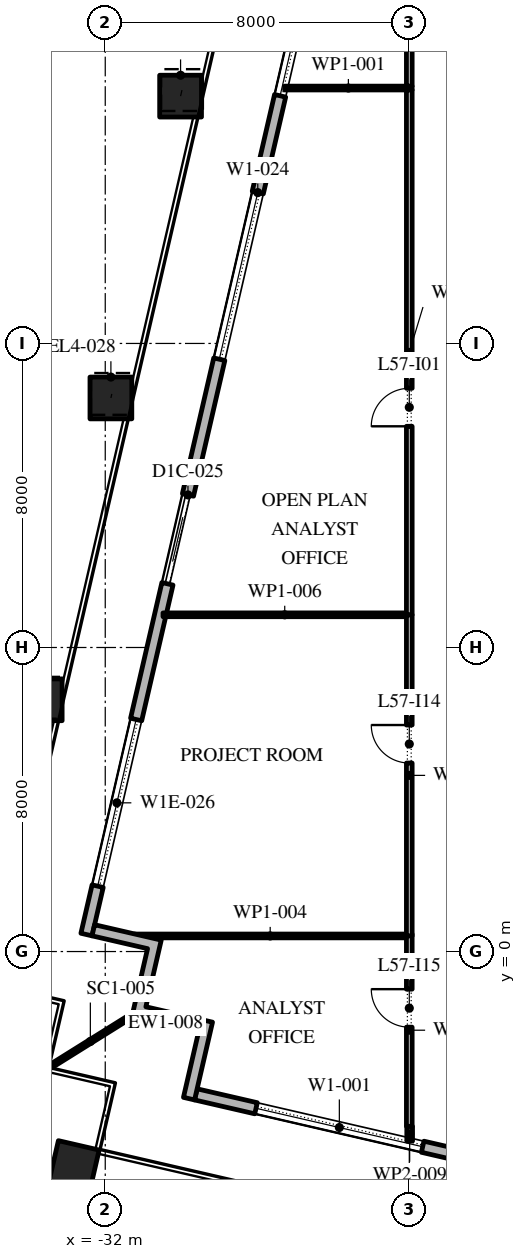
"""IFC4 building model, lengths in metres.
Left out: names, types, materials, properties, quantities, classifications, styles, units other than length and angle.
Written with IfcOpenShell. Run it as: python <this file> out.ifc"""

import sys

from ifc_helpers import new_model, si_unit, direction, frame, frame_2d, origin, origin_2d, place, context, subcontext, project, spatial, polyline, rectangle, outline, extrude, element, fill, save


model = new_model("IFC4")
c1 = context("Model", 3, precision=1e-05, world=origin(), true_north=direction((0.0, 1.0)))
c2 = subcontext(c1, "Body", "Model", "MODEL_VIEW")
j1 = project(units=[si_unit("LENGTHUNIT", "METRE"), si_unit("PLANEANGLEUNIT", "RADIAN")], contexts=[c1])
p1 = place(None, origin())
s1 = spatial("IfcSite", under=j1, at=p1, CompositionType="ELEMENT")
p2 = place(p1, origin())
s2 = spatial("IfcBuilding", under=s1, at=p2, CompositionType="ELEMENT")
p3 = place(p2, frame((0.0, 0.0, 264.0)))
s3 = spatial("IfcBuildingStorey", under=s2, at=p3, CompositionType="ELEMENT", Elevation=264.0)
p4 = place(p3, frame((-32.821, -5.635, 0.0), z_axis=(0.0, 0.0, 1.0), x_axis=(0.974370064785, -0.224951054344, 0.0)))
e1 = element("IfcColumn", 1, at=p4, inside=s3, PredefinedType="COLUMN", context=c2, shape_type="SweptSolid", body=[
    extrude(rectangle(XDim=1.1, YDim=1.1, at=origin_2d()), origin(), (0.0, 0.0, 1.0), 4.2),
])
p5 = place(p3, frame((-30.018, 22.507, 0.0), z_axis=(0.00871278458, 0.037987740768, 0.999240220836), x_axis=(-0.974691740237, 0.22355315143, 0.0)))
e2 = element("IfcColumn", 2, at=p5, inside=s3, PredefinedType="COLUMN", context=c2, shape_type="SweptSolid", body=[
    extrude(rectangle(XDim=1.1, YDim=1.1, at=origin_2d()), origin(), (0.0, 0.0, 1.0), 4.203),
])
p6 = place(p3, frame((-31.851, 14.565, 0.0), z_axis=(0.005810975449, 0.025335852957, 0.999662106474), x_axis=(-0.974691740237, 0.22355315143, 0.0)))
e3 = element("IfcColumn", 3, at=p6, inside=s3, PredefinedType="COLUMN", context=c2, shape_type="SweptSolid", body=[
    extrude(rectangle(XDim=1.1, YDim=1.1, at=origin_2d()), origin(), (0.0, 0.0, 1.0), 4.201),
])
p7 = place(p3, frame((-33.685, 6.624, 0.0), z_axis=(0.002906224189, 0.012671137464, 0.999915494498), x_axis=(-0.974691740237, 0.22355315143, 0.0)))
e4 = element("IfcColumn", 4, at=p7, inside=s3, PredefinedType="COLUMN", context=c2, shape_type="SweptSolid", body=[
    extrude(rectangle(XDim=1.1, YDim=1.1, at=origin_2d()), origin(), (0.0, 0.0, 1.0), 4.2),
])
p8 = place(p3, frame((-29.616, -3.758, 0.0), z_axis=(0.0, 0.0, 1.0), x_axis=(0.974370532314, -0.224949029246, 0.0)))
e5 = element("IfcWall", 5, at=p8, inside=s3, PredefinedType="STANDARD", context=c2, shape_type="SweptSolid", body=[
    extrude(rectangle(XDim=48.0, YDim=0.3, at=frame_2d((24.0, 0.0))), origin(), (0.0, 0.0, 1.0), 4.0),
])
p9 = place(p8, frame((1.625, 0.0, 0.45)))
e6 = element("IfcOpeningElement", 6, at=p9, cuts=e5, PredefinedType="OPENING", context=c2, shape_type="SweptSolid", body=[
    extrude(rectangle(XDim=4.5, YDim=3.05, at=frame_2d((2.25, 1.525))), frame((0.0, 0.16, 0.0), z_axis=(0.0, -1.0, 0.0), x_axis=(1.0, 0.0, 0.0)), (0.0, 0.0, 1.0), 0.32),
])
p10 = place(p8, frame((10.575, 0.0, 0.0)))
e7 = element("IfcOpeningElement", 7, at=p10, cuts=e5, PredefinedType="OPENING", context=c2, shape_type="SweptSolid", body=[
    extrude(rectangle(XDim=2.4, YDim=3.5, at=frame_2d((1.2, 1.75))), frame((0.0, 0.16, 0.0), z_axis=(0.0, -1.0, 0.0), x_axis=(1.0, 0.0, 0.0)), (0.0, 0.0, 1.0), 0.32),
])
p11 = place(p8, frame((17.575, 0.0, 0.45)))
e8 = element("IfcOpeningElement", 8, at=p11, cuts=e5, PredefinedType="OPENING", context=c2, shape_type="SweptSolid", body=[
    extrude(rectangle(XDim=4.5, YDim=3.0, at=frame_2d((2.25, 1.5))), frame((0.0, 0.16, 0.0), z_axis=(0.0, -1.0, 0.0), x_axis=(1.0, 0.0, 0.0)), (0.0, 0.0, 1.0), 0.32),
])
p12 = place(p8, frame((25.625, 0.0, 0.45)))
e9 = element("IfcOpeningElement", 9, at=p12, cuts=e5, PredefinedType="OPENING", context=c2, shape_type="SweptSolid", body=[
    extrude(rectangle(XDim=4.5, YDim=2.95, at=frame_2d((2.25, 1.475))), frame((0.0, 0.16, 0.0), z_axis=(0.0, -1.0, 0.0), x_axis=(1.0, 0.0, 0.0)), (0.0, 0.0, 1.0), 0.32),
])
p13 = place(p8, frame((33.675, 0.0, 0.45)))
e10 = element("IfcOpeningElement", 10, at=p13, cuts=e5, PredefinedType="OPENING", context=c2, shape_type="SweptSolid", body=[
    extrude(rectangle(XDim=4.5, YDim=2.825, at=frame_2d((2.25, 1.413))), frame((0.0, 0.16, 0.0), z_axis=(0.0, -1.0, 0.0), x_axis=(1.0, 0.0, 0.0)), (0.0, 0.0, 1.0), 0.32),
])
p14 = place(p8, frame((42.775, 0.0, 0.0)))
e11 = element("IfcOpeningElement", 11, at=p14, cuts=e5, PredefinedType="OPENING", context=c2, shape_type="SweptSolid", body=[
    extrude(rectangle(XDim=2.4, YDim=3.5, at=frame_2d((1.2, 1.75))), frame((0.0, 0.16, 0.0), z_axis=(0.0, -1.0, 0.0), x_axis=(1.0, 0.0, 0.0)), (0.0, 0.0, 1.0), 0.32),
])
p15 = place(p3, frame((-21.359, 48.678, 0.0), z_axis=(0.0, 0.0, 1.0), x_axis=(-0.224949198343, -0.974370493275, 0.0)))
e12 = element("IfcWall", 12, at=p15, inside=s3, PredefinedType="STANDARD", context=c2, shape_type="SweptSolid", body=[
    extrude(rectangle(XDim=49.5, YDim=0.3, at=frame_2d((24.75, 0.0))), origin(), (0.0, 0.0, 1.0), 4.0),
])
p16 = place(p15, frame((1.157, 0.0, 0.45)))
e13 = element("IfcOpeningElement", 13, at=p16, cuts=e12, PredefinedType="OPENING", context=c2, shape_type="SweptSolid", body=[
    extrude(rectangle(XDim=4.5, YDim=3.05, at=frame_2d((2.25, 1.525))), frame((0.0, 0.16, 0.0), z_axis=(0.0, -1.0, 0.0), x_axis=(1.0, 0.0, 0.0)), (0.0, 0.0, 1.0), 0.32),
])
p17 = place(p15, frame((9.171, 0.0, 0.0)))
e14 = element("IfcOpeningElement", 14, at=p17, cuts=e12, PredefinedType="OPENING", context=c2, shape_type="SweptSolid", body=[
    extrude(rectangle(XDim=2.4, YDim=3.5, at=frame_2d((1.2, 1.75))), frame((0.0, 0.16, 0.0), z_axis=(0.0, -1.0, 0.0), x_axis=(1.0, 0.0, 0.0)), (0.0, 0.0, 1.0), 0.32),
])
p18 = place(p15, frame((15.236, 0.0, 0.45)))
e15 = element("IfcOpeningElement", 15, at=p18, cuts=e12, PredefinedType="OPENING", context=c2, shape_type="SweptSolid", body=[
    extrude(rectangle(XDim=4.5, YDim=3.05, at=frame_2d((2.25, 1.525))), frame((0.0, 0.16, 0.0), z_axis=(0.0, -1.0, 0.0), x_axis=(1.0, 0.0, 0.0)), (0.0, 0.0, 1.0), 0.32),
])
p19 = place(p15, frame((22.35, 0.0, 0.45)))
e16 = element("IfcOpeningElement", 16, at=p19, cuts=e12, PredefinedType="OPENING", context=c2, shape_type="SweptSolid", body=[
    extrude(rectangle(XDim=4.5, YDim=3.05, at=frame_2d((2.25, 1.525))), frame((0.0, 0.16, 0.0), z_axis=(0.0, -1.0, 0.0), x_axis=(1.0, 0.0, 0.0)), (0.0, 0.0, 1.0), 0.32),
])
p20 = place(p15, frame((29.464, 0.0, 0.45)))
e17 = element("IfcOpeningElement", 17, at=p20, cuts=e12, PredefinedType="OPENING", context=c2, shape_type="SweptSolid", body=[
    extrude(rectangle(XDim=4.5, YDim=3.05, at=frame_2d((2.25, 1.525))), frame((0.0, 0.16, 0.0), z_axis=(0.0, -1.0, 0.0), x_axis=(1.0, 0.0, 0.0)), (0.0, 0.0, 1.0), 0.32),
])
p21 = place(p15, frame((37.628, 0.0, 0.0)))
e18 = element("IfcOpeningElement", 18, at=p21, cuts=e12, PredefinedType="OPENING", context=c2, shape_type="SweptSolid", body=[
    extrude(rectangle(XDim=2.4, YDim=3.325, at=frame_2d((1.2, 1.663))), frame((0.0, 0.16, 0.0), z_axis=(0.0, -1.0, 0.0), x_axis=(1.0, 0.0, 0.0)), (0.0, 0.0, 1.0), 0.32),
])
p22 = place(p15, frame((43.693, 0.0, 0.45)))
e19 = element("IfcOpeningElement", 19, at=p22, cuts=e12, PredefinedType="OPENING", context=c2, shape_type="SweptSolid", body=[
    extrude(rectangle(XDim=4.5, YDim=2.825, at=frame_2d((2.25, 1.413))), frame((0.0, 0.16, 0.0), z_axis=(0.0, -1.0, 0.0), x_axis=(1.0, 0.0, 0.0)), (0.0, 0.0, 1.0), 0.32),
])
p23 = place(p3, origin())
e20 = element("IfcWall", 20, at=p23, inside=s3, PredefinedType="STANDARD", context=c2, shape_type="SweptSolid", body=[
    extrude(outline(polyline([(-31.291, -1.678), (-30.886, 0.076), (-32.348, 0.413), (-32.28, 0.705), (-30.526, 0.301), (-30.931, -1.453), (-29.177, -1.858), (-29.65, -3.905), (-29.942, -3.837), (-29.537, -2.083), (-31.291, -1.678)])), origin(), (0.0, 0.0, 1.0), 4.0),
])
p24 = place(p3, frame((-31.291, -1.678, -0.05), z_axis=(0.0, 0.0, 1.0), x_axis=(-0.84807753525, -0.529872148923, 0.0)))
e21 = element("IfcWall", 21, at=p24, inside=s3, PredefinedType="STANDARD", context=c2, shape_type="SweptSolid", body=[
    extrude(rectangle(XDim=2.596, YDim=0.1, at=frame_2d((1.298, 0.0))), origin(), (0.0, 0.0, 1.0), 4.05),
])
p25 = place(p3, frame((-27.28, 22.72, 0.0), z_axis=(0.0, 0.0, 1.0), x_axis=(1.0, 0.0, 0.0)))
e22 = element("IfcWall", 22, at=p25, inside=s3, PredefinedType="PARTITIONING", context=c2, shape_type="SweptSolid", body=[
    extrude(rectangle(XDim=3.355, YDim=0.1, at=frame_2d((1.677, 0.0))), origin(), (0.0, 0.0, 1.0), 4.0),
])
p26 = place(p3, frame((-24.0, -4.6, 0.0), z_axis=(0.0, 0.0, 1.0), x_axis=(0.0, 1.0, 0.0)))
e23 = element("IfcWall", 23, at=p26, inside=s3, PredefinedType="PARTITIONING", context=c2, shape_type="SweptSolid", body=[
    extrude(rectangle(XDim=5.06, YDim=0.15, at=frame_2d((2.53, 0.0))), origin(), (0.0, 0.0, 1.0), 4.0),
])
p27 = place(p26, frame((2.61, 0.0, 0.0)))
e24 = element("IfcOpeningElement", 24, at=p27, cuts=e23, PredefinedType="OPENING", context=c2, shape_type="SweptSolid", body=[
    extrude(rectangle(XDim=1.0, YDim=2.1, at=frame_2d((0.5, 1.05))), frame((0.0, 0.085, 0.0), z_axis=(0.0, -1.0, 0.0), x_axis=(1.0, 0.0, 0.0)), (0.0, 0.0, 1.0), 0.17),
])
p28 = place(p3, frame((-24.075, 0.41, 0.0), z_axis=(0.0, 0.0, 1.0), x_axis=(-1.0, 0.0, 0.0)))
e25 = element("IfcWall", 25, at=p28, inside=s3, PredefinedType="PARTITIONING", context=c2, shape_type="SweptSolid", body=[
    extrude(rectangle(XDim=7.17, YDim=0.1, at=frame_2d((3.585, 0.0))), origin(), (0.0, 0.0, 1.0), 4.0),
])
p29 = place(p3, frame((-24.0, 0.41, 0.0), z_axis=(0.0, 0.0, 1.0), x_axis=(0.0, 1.0, 0.0)))
e26 = element("IfcWall", 26, at=p29, inside=s3, PredefinedType="PARTITIONING", context=c2, shape_type="SweptSolid", body=[
    extrude(rectangle(XDim=8.45, YDim=0.15, at=frame_2d((4.225, 0.0))), origin(), (0.0, 0.0, 1.0), 4.0),
])
p30 = place(p29, frame((4.55, 0.0, 0.0)))
e27 = element("IfcOpeningElement", 27, at=p30, cuts=e26, PredefinedType="OPENING", context=c2, shape_type="SweptSolid", body=[
    extrude(rectangle(XDim=1.0, YDim=2.1, at=frame_2d((0.5, 1.05))), frame((0.0, 0.085, 0.0), z_axis=(0.0, -1.0, 0.0), x_axis=(1.0, 0.0, 0.0)), (0.0, 0.0, 1.0), 0.17),
])
p31 = place(p3, frame((-24.075, 8.86, 0.0), z_axis=(0.0, 0.0, 1.0), x_axis=(-1.0, 0.0, 0.0)))
e28 = element("IfcWall", 28, at=p31, inside=s3, PredefinedType="PARTITIONING", context=c2, shape_type="SweptSolid", body=[
    extrude(rectangle(XDim=6.405, YDim=0.1, at=frame_2d((3.203, 0.0))), origin(), (0.0, 0.0, 1.0), 4.0),
])
p32 = place(p3, frame((-24.0, 8.86, 0.0), z_axis=(0.0, 0.0, 1.0), x_axis=(0.0, 1.0, 0.0)))
e29 = element("IfcWall", 29, at=p32, inside=s3, PredefinedType="PARTITIONING", context=c2, shape_type="SweptSolid", body=[
    extrude(rectangle(XDim=13.81, YDim=0.15, at=frame_2d((6.905, 0.0))), origin(), (0.0, 0.0, 1.0), 4.0),
])
p33 = place(p32, frame((4.96, 0.0, 0.0)))
e30 = element("IfcOpeningElement", 30, at=p33, cuts=e29, PredefinedType="OPENING", context=c2, shape_type="SweptSolid", body=[
    extrude(rectangle(XDim=1.0, YDim=2.1, at=frame_2d((0.5, 1.05))), frame((0.0, 0.085, 0.0), z_axis=(0.0, -1.0, 0.0), x_axis=(1.0, 0.0, 0.0)), (0.0, 0.0, 1.0), 0.17),
])
p34 = place(p3, frame((-24.0, 22.77, 0.0), z_axis=(0.0, 0.0, 1.0), x_axis=(0.0, 1.0, 0.0)))
e31 = element("IfcWall", 31, at=p34, inside=s3, PredefinedType="PARTITIONING", context=c2, shape_type="SweptSolid", body=[
    extrude(rectangle(XDim=9.93, YDim=0.15, at=frame_2d((4.965, 0.0))), origin(), (0.0, 0.0, 1.0), 4.0),
])
p35 = place(p34, frame((4.53, 0.0, 0.0)))
e32 = element("IfcOpeningElement", 32, at=p35, cuts=e31, PredefinedType="OPENING", context=c2, shape_type="SweptSolid", body=[
    extrude(rectangle(XDim=1.0, YDim=2.1, at=frame_2d((0.5, 1.05))), frame((0.0, 0.085, 0.0), z_axis=(0.0, -1.0, 0.0), x_axis=(1.0, 0.0, 0.0)), (0.0, 0.0, 1.0), 0.17),
])
p36 = place(p3, frame((-23.99, -4.986, 0.0), z_axis=(0.0, 0.0, 1.0), x_axis=(0.0, 1.0, 0.0)))
e33 = element("IfcWall", 33, at=p36, inside=s3, PredefinedType="PARTITIONING", context=c2, shape_type="SweptSolid", body=[
    extrude(rectangle(XDim=0.386, YDim=0.15, at=frame_2d((0.193, 0.0))), origin(), (0.0, 0.0, 1.0), 4.0),
])
p37 = place(p9, origin())
e34 = element("IfcWindow", 34, at=p37, inside=s3, PartitioningType="DOUBLE_PANEL_VERTICAL", PredefinedType="WINDOW", context=c2, shape_type="SweptSolid", body=[
    extrude(rectangle(XDim=4.5, YDim=3.05, at=frame_2d((2.25, 1.525))), frame((0.0, 0.03, 0.0), z_axis=(0.0, -1.0, 0.0), x_axis=(1.0, 0.0, 0.0)), (0.0, 0.0, 1.0), 0.06),
])
fill(e6, e34)
p38 = place(p19, origin())
e35 = element("IfcWindow", 35, at=p38, inside=s3, PartitioningType="DOUBLE_PANEL_VERTICAL", PredefinedType="WINDOW", context=c2, shape_type="SweptSolid", body=[
    extrude(rectangle(XDim=4.5, YDim=3.05, at=frame_2d((2.25, 1.525))), frame((0.0, 0.03, 0.0), z_axis=(0.0, -1.0, 0.0), x_axis=(1.0, 0.0, 0.0)), (0.0, 0.0, 1.0), 0.06),
])
fill(e16, e35)
p39 = place(p20, origin())
e36 = element("IfcWindow", 36, at=p39, inside=s3, PartitioningType="DOUBLE_PANEL_VERTICAL", PredefinedType="WINDOW", context=c2, shape_type="SweptSolid", body=[
    extrude(rectangle(XDim=4.5, YDim=3.05, at=frame_2d((2.25, 1.525))), frame((0.0, 0.03, 0.0), z_axis=(0.0, -1.0, 0.0), x_axis=(1.0, 0.0, 0.0)), (0.0, 0.0, 1.0), 0.06),
])
fill(e17, e36)
p40 = place(p21, origin())
e37 = element("IfcDoor", 37, at=p40, inside=s3, OperationType="DOUBLE_DOOR_SLIDING", PredefinedType="DOOR", context=c2, shape_type="SweptSolid", body=[
    extrude(rectangle(XDim=2.4, YDim=3.325, at=frame_2d((1.2, 1.663))), frame((0.0, 0.025, 0.0), z_axis=(0.0, -1.0, 0.0), x_axis=(1.0, 0.0, 0.0)), (0.0, 0.0, 1.0), 0.05),
])
fill(e18, e37)
p41 = place(p22, origin())
e38 = element("IfcWindow", 38, at=p41, inside=s3, PartitioningType="DOUBLE_PANEL_VERTICAL", PredefinedType="WINDOW", context=c2, shape_type="SweptSolid", body=[
    extrude(rectangle(XDim=4.5, YDim=2.825, at=frame_2d((2.25, 1.413))), frame((0.0, 0.03, 0.0), z_axis=(0.0, -1.0, 0.0), x_axis=(1.0, 0.0, 0.0)), (0.0, 0.0, 1.0), 0.06),
])
fill(e19, e38)
p42 = place(p33, origin())
e39 = element("IfcDoor", 39, at=p42, inside=s3, OperationType="SINGLE_SWING_RIGHT", PredefinedType="DOOR", context=c2, shape_type="SweptSolid", body=[
    extrude(rectangle(XDim=1.0, YDim=2.1, at=frame_2d((0.5, 1.05))), frame((0.0, 0.025, 0.0), z_axis=(0.0, -1.0, 0.0), x_axis=(1.0, 0.0, 0.0)), (0.0, 0.0, 1.0), 0.05),
])
fill(e30, e39)
p43 = place(p30, origin())
e40 = element("IfcDoor", 40, at=p43, inside=s3, OperationType="SINGLE_SWING_LEFT", PredefinedType="DOOR", context=c2, shape_type="SweptSolid", body=[
    extrude(rectangle(XDim=1.0, YDim=2.1, at=frame_2d((0.5, 1.05))), frame((0.0, 0.025, 0.0), z_axis=(0.0, -1.0, 0.0), x_axis=(1.0, 0.0, 0.0)), (0.0, 0.0, 1.0), 0.05),
])
fill(e27, e40)
p44 = place(p27, origin())
e41 = element("IfcDoor", 41, at=p44, inside=s3, OperationType="SINGLE_SWING_LEFT", PredefinedType="DOOR", context=c2, shape_type="SweptSolid", body=[
    extrude(rectangle(XDim=1.0, YDim=2.1, at=frame_2d((0.5, 1.05))), frame((0.0, 0.025, 0.0), z_axis=(0.0, -1.0, 0.0), x_axis=(1.0, 0.0, 0.0)), (0.0, 0.0, 1.0), 0.05),
])
fill(e24, e41)
save(model, sys.argv[1])
